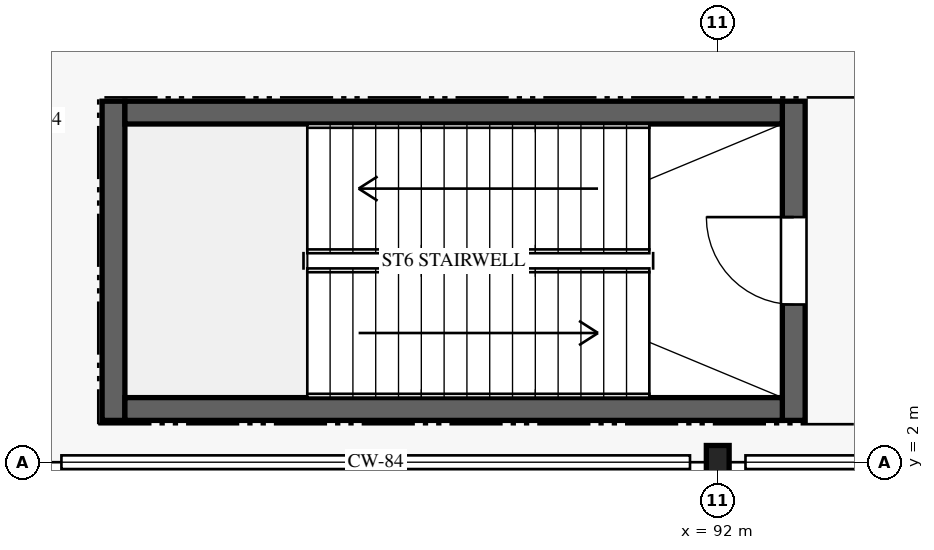
"""IFC4 building model, lengths in metres.
Left out: names, types, materials, properties, quantities, classifications, styles, units other than length and angle.
Written with IfcOpenShell. Run it as: python <this file> out.ifc"""

import sys

from ifc_helpers import new_model, si_unit, direction, frame, frame_2d, origin, origin_2d, place, context, subcontext, project, spatial, rectangle, i_section, extrude, element, fill, save


model = new_model("IFC4")
c1 = context("Model", 3, precision=1e-05, world=origin(), true_north=direction((0.0, 1.0)))
c2 = subcontext(c1, "Body", "Model", "MODEL_VIEW")
j1 = project(units=[si_unit("LENGTHUNIT", "METRE"), si_unit("PLANEANGLEUNIT", "RADIAN")], contexts=[c1])
p1 = place(None, origin())
s1 = spatial("IfcSite", under=j1, at=p1, CompositionType="ELEMENT")
p2 = place(p1, origin())
s2 = spatial("IfcBuilding", under=s1, at=p2, CompositionType="ELEMENT")
p3 = place(p2, frame((0.0, 0.0, 5.4)))
s3 = spatial("IfcBuildingStorey", under=s2, at=p3, CompositionType="ELEMENT", Elevation=5.4)
p4 = place(p3, frame((92.0, 2.0, 0.0), z_axis=(0.0, 0.0, 1.0), x_axis=(1.0, 0.0, 0.0)))
e1 = element("IfcColumn", 1, at=p4, inside=s3, PredefinedType="COLUMN", context=c2, shape_type="SweptSolid", body=[
    extrude(i_section(OverallWidth=0.3, OverallDepth=0.44, WebThickness=0.011, FlangeThickness=0.021, FilletRadius=0.027, at=origin_2d()), origin(), (0.0, 0.0, 1.0), 4.8),
])
p5 = place(p3, frame((93.0, 2.55, 0.0), z_axis=(0.0, 0.0, 1.0), x_axis=(0.0, 1.0, 0.0)))
e2 = element("IfcWall", 2, at=p5, inside=s3, PredefinedType="SHEAR", context=c2, shape_type="SweptSolid", body=[
    extrude(rectangle(XDim=4.2, YDim=0.3, at=frame_2d((2.1, 0.0))), origin(), (0.0, 0.0, 1.0), 4.44),
])
p6 = place(p5, frame((1.525, 0.0, 0.0)))
e3 = element("IfcOpeningElement", 3, at=p6, cuts=e2, PredefinedType="OPENING", context=c2, shape_type="SweptSolid", body=[
    extrude(rectangle(XDim=1.15, YDim=2.2, at=frame_2d((0.575, 1.1))), frame((0.0, 0.16, 0.0), z_axis=(0.0, -1.0, 0.0), x_axis=(1.0, 0.0, 0.0)), (0.0, 0.0, 1.0), 0.32),
])
p7 = place(p3, frame((84.05, 2.55, 0.0), z_axis=(0.0, 0.0, 1.0), x_axis=(0.0, 1.0, 0.0)))
e4 = element("IfcWall", 4, at=p7, inside=s3, PredefinedType="SHEAR", context=c2, shape_type="SweptSolid", body=[
    extrude(rectangle(XDim=4.2, YDim=0.3, at=frame_2d((2.1, 0.0))), origin(), (0.0, 0.0, 1.0), 4.44),
])
for number, where, z_axis, x_axis in (
    (5, (84.2, 2.7, 0.0), (0.0, 0.0, 1.0), (1.0, 0.0, 0.0)),
    (6, (84.2, 6.6, 0.0), (0.0, 0.0, 1.0), (1.0, 0.0, 0.0)),
):
    element("IfcWall", number, at=place(p3, frame(where, z_axis=z_axis, x_axis=x_axis)), inside=s3, PredefinedType="SHEAR", context=c2, shape_type="SweptSolid", body=[
        extrude(rectangle(XDim=8.65, YDim=0.3, at=frame_2d((4.325, 0.0))), origin(), (0.0, 0.0, 1.0), 4.44),
    ])
p8 = place(p6, origin())
e7 = element("IfcDoor", 7, at=p8, inside=s3, OperationType="SINGLE_SWING_RIGHT", PredefinedType="DOOR", context=c2, shape_type="SweptSolid", body=[
    extrude(rectangle(XDim=1.15, YDim=2.2, at=frame_2d((0.575, 1.1))), frame((0.0, 0.025, 0.0), z_axis=(0.0, -1.0, 0.0), x_axis=(1.0, 0.0, 0.0)), (0.0, 0.0, 1.0), 0.05),
])
fill(e3, e7)
save(model, sys.argv[1])
